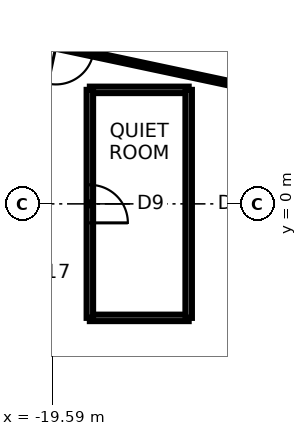
"""IFC4 building model, lengths in metres.
Left out: names, types, materials, properties, quantities, classifications, styles, units other than length and angle.
Written with IfcOpenShell. Run it as: python <this file> out.ifc"""

import sys

from ifc_helpers import new_model, si_unit, direction, frame, frame_2d, origin, place, context, subcontext, project, spatial, rectangle, extrude, element, fill, save


model = new_model("IFC4")
c1 = context("Model", 3, precision=1e-05, world=origin(), true_north=direction((0.0, 1.0)))
c2 = subcontext(c1, "Body", "Model", "MODEL_VIEW")
j1 = project(units=[si_unit("LENGTHUNIT", "METRE"), si_unit("PLANEANGLEUNIT", "RADIAN")], contexts=[c1])
p1 = place(None, origin())
s1 = spatial("IfcSite", under=j1, at=p1, CompositionType="ELEMENT")
p2 = place(p1, origin())
s2 = spatial("IfcBuilding", under=s1, at=p2, CompositionType="ELEMENT")
p3 = place(p2, frame((0.0, 0.0, 215.0)))
s3 = spatial("IfcBuildingStorey", under=s2, at=p3, CompositionType="ELEMENT", Elevation=215.0)
p4 = place(p3, frame((-16.0, -3.0, 0.0), z_axis=(0.0, 0.0, 1.0), x_axis=(-1.0, 0.0, 0.0)))
e1 = element("IfcWall", 1, at=p4, inside=s3, PredefinedType="PARTITIONING", context=c2, shape_type="SweptSolid", body=[
    extrude(rectangle(XDim=2.6, YDim=0.17, at=frame_2d((1.3, 0.0))), origin(), (0.0, 0.0, 1.0), 3.74),
])
p5 = place(p3, frame((-14.2, 3.018, 0.0), z_axis=(0.0, 0.0, 1.0), x_axis=(-0.978146067863, 0.207918902279, 0.0)))
e2 = element("IfcWall", 2, at=p5, inside=s3, PredefinedType="PARTITIONING", context=c2, shape_type="SweptSolid", body=[
    extrude(rectangle(XDim=9.321, YDim=0.12, at=frame_2d((4.66, 0.0))), origin(), (0.0, 0.0, 1.0), 3.74),
])
p6 = place(p5, frame((4.411, 0.0, 0.0)))
e3 = element("IfcOpeningElement", 3, at=p6, cuts=e2, PredefinedType="OPENING", context=c2, shape_type="SweptSolid", body=[
    extrude(rectangle(XDim=1.0, YDim=2.4, at=frame_2d((0.5, 1.2))), frame((0.0, 0.07, 0.0), z_axis=(0.0, -1.0, 0.0), x_axis=(1.0, 0.0, 0.0)), (0.0, 0.0, 1.0), 0.14),
])
p7 = place(p3, frame((-18.6, 3.0, 0.0), z_axis=(0.0, 0.0, 1.0), x_axis=(1.0, 0.0, 0.0)))
e4 = element("IfcWall", 4, at=p7, inside=s3, PredefinedType="PARTITIONING", context=c2, shape_type="SweptSolid", body=[
    extrude(rectangle(XDim=2.6, YDim=0.17, at=frame_2d((1.3, 0.0))), origin(), (0.0, 0.0, 1.0), 3.74),
])
p8 = place(p3, frame((-18.6, -3.0, 0.0), z_axis=(0.0, 0.0, 1.0), x_axis=(0.0, 1.0, 0.0)))
e5 = element("IfcWall", 5, at=p8, inside=s3, PredefinedType="PARTITIONING", context=c2, shape_type="SweptSolid", body=[
    extrude(rectangle(XDim=6.0, YDim=0.17, at=frame_2d((3.0, 0.0))), origin(), (0.0, 0.0, 1.0), 3.74),
])
p9 = place(p8, frame((2.5, 0.0, 0.0)))
e6 = element("IfcOpeningElement", 6, at=p9, cuts=e5, PredefinedType="OPENING", context=c2, shape_type="SweptSolid", body=[
    extrude(rectangle(XDim=1.0, YDim=2.4, at=frame_2d((0.5, 1.2))), frame((0.0, 0.095, 0.0), z_axis=(0.0, -1.0, 0.0), x_axis=(1.0, 0.0, 0.0)), (0.0, 0.0, 1.0), 0.19),
])
p10 = place(p3, frame((-16.0, 3.0, 0.0), z_axis=(0.0, 0.0, 1.0), x_axis=(0.0, -1.0, 0.0)))
e7 = element("IfcWall", 7, at=p10, inside=s3, PredefinedType="PARTITIONING", context=c2, shape_type="SweptSolid", body=[
    extrude(rectangle(XDim=6.0, YDim=0.17, at=frame_2d((3.0, 0.0))), origin(), (0.0, 0.0, 1.0), 3.74),
])
p11 = place(p9, frame((1.0, 0.0, 0.0), z_axis=(0.0, 0.0, 1.0), x_axis=(-1.0, 0.0, 0.0)))
e8 = element("IfcDoor", 8, at=p11, inside=s3, OperationType="SINGLE_SWING_RIGHT", PredefinedType="DOOR", context=c2, shape_type="SweptSolid", body=[
    extrude(rectangle(XDim=1.0, YDim=2.4, at=frame_2d((0.5, 1.2))), frame((0.0, 0.025, 0.0), z_axis=(0.0, -1.0, 0.0), x_axis=(1.0, 0.0, 0.0)), (0.0, 0.0, 1.0), 0.05),
])
fill(e6, e8)
p12 = place(p6, origin())
e9 = element("IfcDoor", 9, at=p12, inside=s3, OperationType="SINGLE_SWING_RIGHT", PredefinedType="DOOR", context=c2, shape_type="SweptSolid", body=[
    extrude(rectangle(XDim=1.0, YDim=2.4, at=frame_2d((0.5, 1.2))), frame((0.0, 0.025, 0.0), z_axis=(0.0, -1.0, 0.0), x_axis=(1.0, 0.0, 0.0)), (0.0, 0.0, 1.0), 0.05),
])
fill(e3, e9)
save(model, sys.argv[1])
